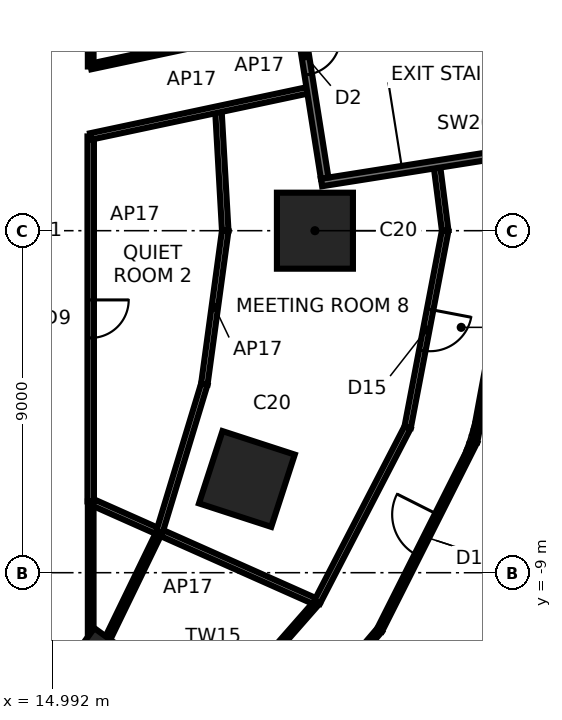
"""IFC4 building model, lengths in metres.
Left out: names, types, materials, properties, quantities, classifications, styles, units other than length and angle.
Written with IfcOpenShell. Run it as: python <this file> out.ifc"""

import sys

from ifc_helpers import new_model, si_unit, direction, frame, frame_2d, origin, origin_2d, place, context, subcontext, project, spatial, rectangle, extrude, element, fill, save


model = new_model("IFC4")
c1 = context("Model", 3, precision=1e-05, world=origin(), true_north=direction((0.0, 1.0)))
c2 = subcontext(c1, "Body", "Model", "MODEL_VIEW")
j1 = project(units=[si_unit("LENGTHUNIT", "METRE"), si_unit("PLANEANGLEUNIT", "RADIAN")], contexts=[c1])
p1 = place(None, origin())
s1 = spatial("IfcSite", under=j1, at=p1, CompositionType="ELEMENT")
p2 = place(p1, origin())
s2 = spatial("IfcBuilding", under=s1, at=p2, CompositionType="ELEMENT")
p3 = place(p2, frame((0.0, 0.0, 15.1)))
s3 = spatial("IfcBuildingStorey", under=s2, at=p3, CompositionType="ELEMENT", Elevation=15.1)
for number, where, z_axis, x_axis in (
    (1, (21.9, 0.0, 0.0), (0.0, 0.0, 1.0), (1.0, 0.0, 0.0)),
    (2, (16.315, -11.854, 0.0), (0.0, 0.0, 1.0), (0.809, -0.588, 0.0)),
    (3, (20.109, -6.534, 0.0), (0.0, 0.0, 1.0), (0.951, -0.309, 0.0)),
):
    element("IfcColumn", number, at=place(p3, frame(where, z_axis=z_axis, x_axis=x_axis)), inside=s3, PredefinedType="COLUMN", context=c2, shape_type="SweptSolid", body=[
        extrude(rectangle(XDim=2.0, YDim=2.0, at=origin_2d()), origin(), (0.0, 0.0, 1.0), 4.5),
    ])
p4 = place(p3, frame((17.808, -7.929, 0.0), z_axis=(0.0, 0.0, 1.0), x_axis=(-0.436650319891, -0.899631312338, 0.0)))
e4 = element("IfcWall", 4, at=p4, inside=s3, PredefinedType="PARTITIONING", context=c2, shape_type="SweptSolid", body=[
    extrude(rectangle(XDim=4.117, YDim=0.15, at=frame_2d((2.058, 0.0))), origin(), (0.0, 0.0, 1.0), 4.3),
])
p5 = place(p3, frame((16.0, -11.3, 0.0), z_axis=(0.0, 0.0, 1.0), x_axis=(0.0, 1.0, 0.0)))
e5 = element("IfcWall", 5, at=p5, inside=s3, PredefinedType="PARTITIONING", context=c2, shape_type="SweptSolid", body=[
    extrude(rectangle(XDim=4.176, YDim=0.15, at=frame_2d((2.088, 0.0))), origin(), (0.0, 0.0, 1.0), 4.3),
])
p6 = place(p3, frame((20.104, -14.606, 0.0), z_axis=(0.0, 0.0, 1.0), x_axis=(0.649319914551, 0.760515383518, 0.0)))
e6 = element("IfcWall", 6, at=p6, inside=s3, PredefinedType="PARTITIONING", context=c2, shape_type="SweptSolid", body=[
    extrude(rectangle(XDim=5.388, YDim=0.15, at=frame_2d((2.694, 0.0))), origin(), (0.0, 0.0, 1.0), 4.3),
])
p7 = place(p3, frame((21.958, -9.776, 0.0), z_axis=(0.0, 0.0, 1.0), x_axis=(-0.659640366347, -0.751581390859, 0.0)))
e7 = element("IfcWall", 7, at=p7, inside=s3, PredefinedType="PARTITIONING", context=c2, shape_type="SweptSolid", body=[
    extrude(rectangle(XDim=5.019, YDim=0.15, at=frame_2d((2.509, 0.0))), origin(), (0.0, 0.0, 1.0), 4.3),
])
p8 = place(p7, frame((1.909, 0.0, 0.0)))
e8 = element("IfcOpeningElement", 8, at=p8, cuts=e7, PredefinedType="OPENING", context=c2, shape_type="SweptSolid", body=[
    extrude(rectangle(XDim=1.2, YDim=2.4, at=frame_2d((0.6, 1.2))), frame((0.0, 0.085, 0.0), z_axis=(0.0, -1.0, 0.0), x_axis=(1.0, 0.0, 0.0)), (0.0, 0.0, 1.0), 0.17),
])
p9 = place(p3, frame((16.0, -7.124, 0.0), z_axis=(0.0, 0.0, 1.0), x_axis=(0.91355819357, -0.40670803651, 0.0)))
e9 = element("IfcWall", 9, at=p9, inside=s3, PredefinedType="PARTITIONING", context=c2, shape_type="SweptSolid", body=[
    extrude(rectangle(XDim=6.521, YDim=0.17, at=frame_2d((3.261, 0.0))), origin(), (0.0, 0.0, 1.0), 4.3),
])
p10 = place(p3, frame((18.99, -4.037, 0.0), z_axis=(0.0, 0.0, 1.0), x_axis=(-0.290562074662, -0.956856144239, 0.0)))
e10 = element("IfcWall", 10, at=p10, inside=s3, PredefinedType="PARTITIONING", context=c2, shape_type="SweptSolid", body=[
    extrude(rectangle(XDim=4.068, YDim=0.17, at=frame_2d((2.034, 0.0))), origin(), (0.0, 0.0, 1.0), 4.3),
])
p11 = place(p3, frame((23.602, -10.508, 0.0), z_axis=(0.0, 0.0, 1.0), x_axis=(0.449813968623, 0.893122272498, 0.0)))
e11 = element("IfcWall", 11, at=p11, inside=s3, PredefinedType="PARTITIONING", context=c2, shape_type="SweptSolid", body=[
    extrude(rectangle(XDim=5.554, YDim=0.15, at=frame_2d((2.777, 0.0))), origin(), (0.0, 0.0, 1.0), 4.3),
])
p12 = place(p11, frame((2.202, 0.0, 0.0)))
e12 = element("IfcOpeningElement", 12, at=p12, cuts=e11, PredefinedType="OPENING", context=c2, shape_type="SweptSolid", body=[
    extrude(rectangle(XDim=1.2, YDim=2.4, at=frame_2d((0.6, 1.2))), frame((0.0, 0.085, 0.0), z_axis=(0.0, -1.0, 0.0), x_axis=(1.0, 0.0, 0.0)), (0.0, 0.0, 1.0), 0.17),
])
p13 = place(p3, frame((24.34, -5.174, 0.0), z_axis=(0.0, 0.0, 1.0), x_axis=(-0.459607460875, -0.888122166094, 0.0)))
e13 = element("IfcWall", 13, at=p13, inside=s3, PredefinedType="PARTITIONING", context=c2, shape_type="SweptSolid", body=[
    extrude(rectangle(XDim=5.182, YDim=0.17, at=frame_2d((2.591, 0.0))), origin(), (0.0, 0.0, 1.0), 4.3),
])
p14 = place(p3, frame((16.0, -7.124, 0.0), z_axis=(0.0, 0.0, 1.0), x_axis=(0.0, 1.0, 0.0)))
e14 = element("IfcWall", 14, at=p14, inside=s3, PredefinedType="PARTITIONING", context=c2, shape_type="SweptSolid", body=[
    extrude(rectangle(XDim=9.604, YDim=0.17, at=frame_2d((4.802, 0.0))), origin(), (0.0, 0.0, 1.0), 4.3),
])
p15 = place(p14, frame((4.302, 0.0, 0.0)))
e15 = element("IfcOpeningElement", 15, at=p15, cuts=e14, PredefinedType="OPENING", context=c2, shape_type="SweptSolid", body=[
    extrude(rectangle(XDim=1.0, YDim=2.4, at=frame_2d((0.5, 1.2))), frame((0.0, 0.095, 0.0), z_axis=(0.0, -1.0, 0.0), x_axis=(1.0, 0.0, 0.0)), (0.0, 0.0, 1.0), 0.19),
])
p16 = place(p3, frame((19.54, 0.0, 0.0), z_axis=(0.0, 0.0, 1.0), x_axis=(-0.135016930919, -0.990843291528, 0.0)))
e16 = element("IfcWall", 16, at=p16, inside=s3, PredefinedType="PARTITIONING", context=c2, shape_type="SweptSolid", body=[
    extrude(rectangle(XDim=4.074, YDim=0.17, at=frame_2d((2.037, 0.0))), origin(), (0.0, 0.0, 1.0), 4.3),
])
p17 = place(p3, frame((26.1, -5.548, 0.0), z_axis=(0.0, 0.0, 1.0), x_axis=(0.182124897843, 0.98327540475, 0.0)))
e17 = element("IfcWall", 17, at=p17, inside=s3, PredefinedType="PARTITIONING", context=c2, shape_type="SweptSolid", body=[
    extrude(rectangle(XDim=5.642, YDim=0.15, at=frame_2d((2.821, 0.0))), origin(), (0.0, 0.0, 1.0), 4.3),
])
p18 = place(p3, frame((25.328, 0.0, 0.0), z_axis=(0.0, 0.0, 1.0), x_axis=(-0.187631789027, -0.982239437075, 0.0)))
e18 = element("IfcWall", 18, at=p18, inside=s3, PredefinedType="PARTITIONING", context=c2, shape_type="SweptSolid", body=[
    extrude(rectangle(XDim=5.267, YDim=0.17, at=frame_2d((2.634, 0.0))), origin(), (0.0, 0.0, 1.0), 4.3),
])
p19 = place(p18, frame((2.109, 0.0, 0.0)))
e19 = element("IfcOpeningElement", 19, at=p19, cuts=e18, PredefinedType="OPENING", context=c2, shape_type="SweptSolid", body=[
    extrude(rectangle(XDim=1.1, YDim=2.4, at=frame_2d((0.55, 1.2))), frame((0.0, 0.095, 0.0), z_axis=(0.0, -1.0, 0.0), x_axis=(1.0, 0.0, 0.0)), (0.0, 0.0, 1.0), 0.19),
])
p20 = place(p3, frame((25.116, 1.649, 0.0), z_axis=(0.0, 0.0, 1.0), x_axis=(0.127142094225, -0.991884513376, 0.0)))
e20 = element("IfcWall", 20, at=p20, inside=s3, PredefinedType="PARTITIONING", context=c2, shape_type="SweptSolid", body=[
    extrude(rectangle(XDim=1.663, YDim=0.17, at=frame_2d((0.832, 0.0))), origin(), (0.0, 0.0, 1.0), 4.3),
])
p21 = place(p3, frame((19.358, 3.195, 0.0), z_axis=(0.0, 0.0, 1.0), x_axis=(0.056843363857, -0.998383108824, 0.0)))
e21 = element("IfcWall", 21, at=p21, inside=s3, PredefinedType="PARTITIONING", context=c2, shape_type="SweptSolid", body=[
    extrude(rectangle(XDim=3.2, YDim=0.17, at=frame_2d((1.6, 0.0))), origin(), (0.0, 0.0, 1.0), 4.3),
])
p22 = place(p3, frame((16.0, 2.481, 0.0), z_axis=(0.0, 0.0, 1.0), x_axis=(0.978144448143, 0.207926522038, 0.0)))
e22 = element("IfcWall", 22, at=p22, inside=s3, PredefinedType="PARTITIONING", context=c2, shape_type="SweptSolid", body=[
    extrude(rectangle(XDim=5.817, YDim=0.17, at=frame_2d((2.908, 0.0))), origin(), (0.0, 0.0, 1.0), 4.3),
])
p23 = place(p3, frame((19.083, 4.976, 0.0), z_axis=(0.0, 0.0, 1.0), x_axis=(-0.978156882567, -0.207868018433, 0.0)))
e23 = element("IfcWall", 23, at=p23, inside=s3, PredefinedType="PARTITIONING", context=c2, shape_type="SweptSolid", body=[
    extrude(rectangle(XDim=3.152, YDim=0.15, at=frame_2d((1.576, 0.0))), origin(), (0.0, 0.0, 1.0), 4.3),
])
p24 = place(p3, frame((16.0, 4.321, 0.0), z_axis=(0.0, 0.0, 1.0), x_axis=(0.0, 1.0, 0.0)))
e24 = element("IfcWall", 24, at=p24, inside=s3, PredefinedType="PARTITIONING", context=c2, shape_type="SweptSolid", body=[
    extrude(rectangle(XDim=6.979, YDim=0.15, at=frame_2d((3.49, 0.0))), origin(), (0.0, 0.0, 1.0), 4.3),
])
p25 = place(p24, frame((2.915, 0.0, 0.0)))
e25 = element("IfcOpeningElement", 25, at=p25, cuts=e24, PredefinedType="OPENING", context=c2, shape_type="SweptSolid", body=[
    extrude(rectangle(XDim=1.2, YDim=2.4, at=frame_2d((0.6, 1.2))), frame((0.0, 0.085, 0.0), z_axis=(0.0, -1.0, 0.0), x_axis=(1.0, 0.0, 0.0)), (0.0, 0.0, 1.0), 0.17),
])
p26 = place(p3, frame((22.073, 1.269, 0.0), z_axis=(0.0, 0.0, 1.0), x_axis=(0.987684853285, 0.156456481465, 0.0)))
e26 = element("IfcWall", 26, at=p26, inside=s3, PredefinedType="SOLIDWALL", context=c2, shape_type="SweptSolid", body=[
    extrude(rectangle(XDim=8.3, YDim=0.2, at=frame_2d((4.15, 0.0))), origin(), (0.0, 0.0, 1.0), 4.25),
])
p27 = place(p3, frame((22.156, 1.383, 0.0), z_axis=(0.0, 0.0, 1.0), x_axis=(-0.156428225752, 0.987689328781, 0.0)))
e27 = element("IfcWall", 27, at=p27, inside=s3, PredefinedType="SOLIDWALL", context=c2, shape_type="SweptSolid", body=[
    extrude(rectangle(XDim=4.2, YDim=0.2, at=frame_2d((2.1, 0.0))), origin(), (0.0, 0.0, 1.0), 4.25),
])
p28 = place(p27, frame((2.76, 0.0, 0.0)))
e28 = element("IfcOpeningElement", 28, at=p28, cuts=e27, PredefinedType="OPENING", context=c2, shape_type="SweptSolid", body=[
    extrude(rectangle(XDim=1.0, YDim=2.1, at=frame_2d((0.5, 1.05))), frame((0.0, 0.11, 0.0), z_axis=(0.0, -1.0, 0.0), x_axis=(1.0, 0.0, 0.0)), (0.0, 0.0, 1.0), 0.22),
])
p29 = place(p15, frame((1.0, 0.0, 0.0), z_axis=(0.0, 0.0, 1.0), x_axis=(-1.0, 0.0, 0.0)))
e29 = element("IfcDoor", 29, at=p29, inside=s3, OperationType="SINGLE_SWING_LEFT", PredefinedType="DOOR", context=c2, shape_type="SweptSolid", body=[
    extrude(rectangle(XDim=1.0, YDim=2.4, at=frame_2d((0.5, 1.2))), frame((0.0, 0.025, 0.0), z_axis=(0.0, -1.0, 0.0), x_axis=(1.0, 0.0, 0.0)), (0.0, 0.0, 1.0), 0.05),
])
fill(e15, e29)
p30 = place(p19, origin())
e30 = element("IfcDoor", 30, at=p30, inside=s3, OperationType="SINGLE_SWING_LEFT", PredefinedType="DOOR", context=c2, shape_type="SweptSolid", body=[
    extrude(rectangle(XDim=1.1, YDim=2.4, at=frame_2d((0.55, 1.2))), frame((0.0, 0.025, 0.0), z_axis=(0.0, -1.0, 0.0), x_axis=(1.0, 0.0, 0.0)), (0.0, 0.0, 1.0), 0.05),
])
fill(e19, e30)
p31 = place(p12, origin())
e31 = element("IfcDoor", 31, at=p31, inside=s3, OperationType="SINGLE_SWING_RIGHT", PredefinedType="DOOR", context=c2, shape_type="SweptSolid", body=[
    extrude(rectangle(XDim=1.2, YDim=2.4, at=frame_2d((0.6, 1.2))), frame((0.0, 0.025, 0.0), z_axis=(0.0, -1.0, 0.0), x_axis=(1.0, 0.0, 0.0)), (0.0, 0.0, 1.0), 0.05),
])
fill(e12, e31)
p32 = place(p28, frame((1.0, 0.0, 0.0), z_axis=(0.0, 0.0, 1.0), x_axis=(-1.0, 0.0, 0.0)))
e32 = element("IfcDoor", 32, at=p32, inside=s3, OperationType="SINGLE_SWING_LEFT", PredefinedType="DOOR", context=c2, shape_type="SweptSolid", body=[
    extrude(rectangle(XDim=1.0, YDim=2.1, at=frame_2d((0.5, 1.05))), frame((0.0, 0.025, 0.0), z_axis=(0.0, -1.0, 0.0), x_axis=(1.0, 0.0, 0.0)), (0.0, 0.0, 1.0), 0.05),
])
fill(e28, e32)
save(model, sys.argv[1])
